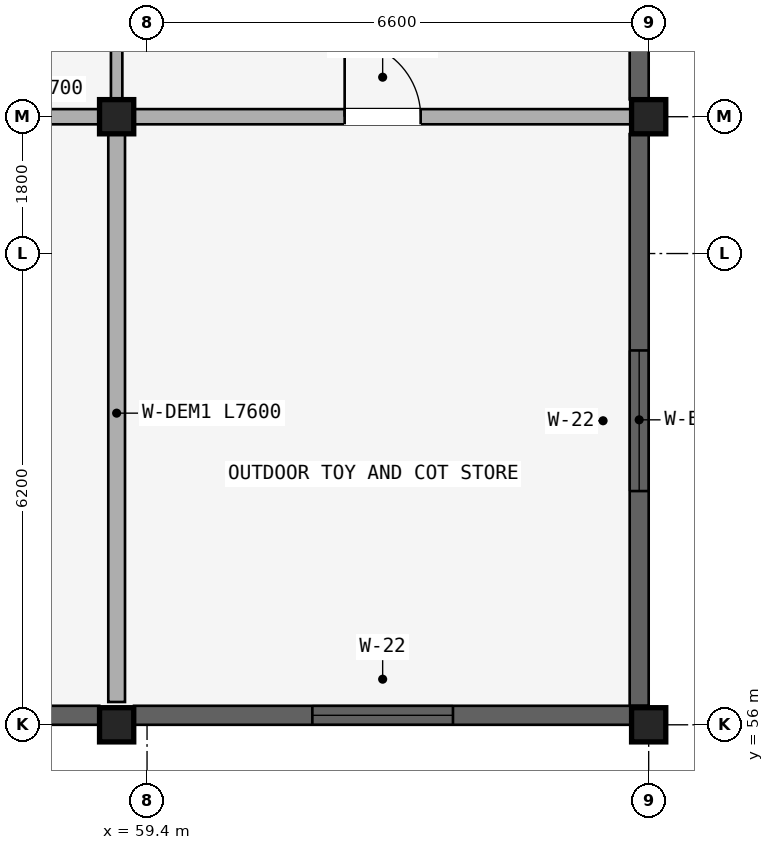
"""IFC4 building model, lengths in metres.
Left out: names, types, materials, properties, quantities, classifications, styles, units other than length and angle.
Written with IfcOpenShell. Run it as: python <this file> out.ifc"""

import sys

from ifc_helpers import new_model, si_unit, direction, frame, frame_2d, origin, origin_2d, place, context, subcontext, project, spatial, rectangle, extrude, element, fill, save


model = new_model("IFC4")
c1 = context("Model", 3, precision=1e-05, world=origin(), true_north=direction((0.0, 1.0)))
c2 = subcontext(c1, "Body", "Model", "MODEL_VIEW")
j1 = project(units=[si_unit("LENGTHUNIT", "METRE"), si_unit("PLANEANGLEUNIT", "RADIAN")], contexts=[c1])
p1 = place(None, origin())
s1 = spatial("IfcSite", under=j1, at=p1, CompositionType="ELEMENT")
p2 = place(p1, origin())
s2 = spatial("IfcBuilding", under=s1, at=p2, CompositionType="ELEMENT")
p3 = place(p2, frame((0.0, 0.0, 4.5)))
s3 = spatial("IfcBuildingStorey", under=s2, at=p3, CompositionType="ELEMENT", Elevation=4.5)
p4 = place(p3, frame((59.0, 56.0, 0.0), z_axis=(0.0, 0.0, 1.0), x_axis=(1.0, 0.0, 0.0)))
e1 = element("IfcColumn", 1, at=p4, inside=s3, PredefinedType="COLUMN", context=c2, shape_type="SweptSolid", body=[
    extrude(rectangle(XDim=0.45, YDim=0.45, at=origin_2d()), origin(), (0.0, 0.0, 1.0), 4.85),
])
p5 = place(p3, frame((59.0, 64.0, 0.0), z_axis=(0.0, 0.0, 1.0), x_axis=(1.0, 0.0, 0.0)))
e2 = element("IfcColumn", 2, at=p5, inside=s3, PredefinedType="COLUMN", context=c2, shape_type="SweptSolid", body=[
    extrude(rectangle(XDim=0.45, YDim=0.45, at=origin_2d()), origin(), (0.0, 0.0, 1.0), 4.0),
])
p6 = place(p3, frame((66.0, 56.0, 0.0), z_axis=(0.0, 0.0, 1.0), x_axis=(1.0, 0.0, 0.0)))
e3 = element("IfcColumn", 3, at=p6, inside=s3, PredefinedType="COLUMN", context=c2, shape_type="SweptSolid", body=[
    extrude(rectangle(XDim=0.45, YDim=0.45, at=origin_2d()), origin(), (0.0, 0.0, 1.0), 4.85),
])
p7 = place(p3, frame((66.0, 64.0, 0.0), z_axis=(0.0, 0.0, 1.0), x_axis=(1.0, 0.0, 0.0)))
e4 = element("IfcColumn", 4, at=p7, inside=s3, PredefinedType="COLUMN", context=c2, shape_type="SweptSolid", body=[
    extrude(rectangle(XDim=0.45, YDim=0.45, at=origin_2d()), origin(), (0.0, 0.0, 1.0), 4.0),
])
p8 = place(p3, frame((52.15, 64.0, 0.0), z_axis=(0.0, 0.0, 1.0), x_axis=(1.0, 0.0, 0.0)))
e5 = element("IfcWall", 5, at=p8, inside=s3, PredefinedType="STANDARD", context=c2, shape_type="SweptSolid", body=[
    extrude(rectangle(XDim=6.7, YDim=0.2, at=frame_2d((3.35, 0.0))), origin(), (0.0, 0.0, 1.0), 2.792),
])
p9 = place(p8, frame((2.85, 0.0, 0.0)))
e6 = element("IfcOpeningElement", 6, at=p9, cuts=e5, PredefinedType="OPENING", context=c2, shape_type="SweptSolid", body=[
    extrude(rectangle(XDim=1.0, YDim=2.15, at=frame_2d((0.5, 1.075))), frame((0.0, 0.11, 0.0), z_axis=(0.0, -1.0, 0.0), x_axis=(1.0, 0.0, 0.0)), (0.0, 0.0, 1.0), 0.22),
])
p10 = place(p3, frame((59.15, 64.0, 0.0), z_axis=(0.0, 0.0, 1.0), x_axis=(1.0, 0.0, 0.0)))
e7 = element("IfcWall", 7, at=p10, inside=s3, PredefinedType="STANDARD", context=c2, shape_type="SweptSolid", body=[
    extrude(rectangle(XDim=6.7, YDim=0.2, at=frame_2d((3.35, 0.0))), origin(), (0.0, 0.0, 1.0), 2.792),
])
p11 = place(p10, frame((2.85, 0.0, 0.0)))
e8 = element("IfcOpeningElement", 8, at=p11, cuts=e7, PredefinedType="OPENING", context=c2, shape_type="SweptSolid", body=[
    extrude(rectangle(XDim=1.0, YDim=2.15, at=frame_2d((0.5, 1.075))), frame((0.0, 0.11, 0.0), z_axis=(0.0, -1.0, 0.0), x_axis=(1.0, 0.0, 0.0)), (0.0, 0.0, 1.0), 0.22),
])
p12 = place(p3, frame((59.0, 56.3, 0.0), z_axis=(0.0, 0.0, 1.0), x_axis=(0.0, 1.0, 0.0)))
e9 = element("IfcWall", 9, at=p12, inside=s3, PredefinedType="STANDARD", context=c2, shape_type="SweptSolid", body=[
    extrude(rectangle(XDim=7.6, YDim=0.22, at=frame_2d((3.8, 0.0))), origin(), (0.0, 0.0, 1.0), 3.442),
])
p13 = place(p3, frame((59.0, 64.1, 0.0), z_axis=(0.0, 0.0, 1.0), x_axis=(0.0, 1.0, 0.0)))
e10 = element("IfcWall", 10, at=p13, inside=s3, PredefinedType="PARTITIONING", context=c2, shape_type="SweptSolid", body=[
    extrude(rectangle(XDim=7.8, YDim=0.15, at=frame_2d((3.9, 0.0))), origin(), (0.0, 0.0, 1.0), 2.792),
])
p14 = place(p13, frame((3.0, 0.0, 0.0)))
e11 = element("IfcOpeningElement", 11, at=p14, cuts=e10, PredefinedType="OPENING", context=c2, shape_type="SweptSolid", body=[
    extrude(rectangle(XDim=1.8, YDim=2.2, at=frame_2d((0.9, 1.1))), frame((0.0, 0.085, 0.0), z_axis=(0.0, -1.0, 0.0), x_axis=(1.0, 0.0, 0.0)), (0.0, 0.0, 1.0), 0.17),
])
p15 = place(p3, frame((52.229, 56.125, 0.0), z_axis=(0.0, 0.0, 1.0), x_axis=(1.0, 0.0, 0.0)))
e12 = element("IfcWall", 12, at=p15, inside=s3, PredefinedType="STANDARD", context=c2, shape_type="SweptSolid", body=[
    extrude(rectangle(XDim=6.543, YDim=0.25, at=frame_2d((3.271, 0.0))), origin(), (0.0, 0.0, 1.0), 3.442),
])
p16 = place(p15, frame((2.346, 0.0, 0.88)))
e13 = element("IfcOpeningElement", 13, at=p16, cuts=e12, PredefinedType="OPENING", context=c2, shape_type="SweptSolid", body=[
    extrude(rectangle(XDim=1.85, YDim=1.9, at=frame_2d((0.925, 0.95))), frame((0.0, 0.135, 0.0), z_axis=(0.0, -1.0, 0.0), x_axis=(1.0, 0.0, 0.0)), (0.0, 0.0, 1.0), 0.27),
])
p17 = place(p3, frame((59.229, 56.125, 0.0), z_axis=(0.0, 0.0, 1.0), x_axis=(1.0, 0.0, 0.0)))
e14 = element("IfcWall", 14, at=p17, inside=s3, PredefinedType="STANDARD", context=c2, shape_type="SweptSolid", body=[
    extrude(rectangle(XDim=6.771, YDim=0.25, at=frame_2d((3.386, 0.0))), origin(), (0.0, 0.0, 1.0), 3.442),
])
p18 = place(p17, frame((2.346, 0.0, 0.88)))
e15 = element("IfcOpeningElement", 15, at=p18, cuts=e14, PredefinedType="OPENING", context=c2, shape_type="SweptSolid", body=[
    extrude(rectangle(XDim=1.85, YDim=1.9, at=frame_2d((0.925, 0.95))), frame((0.0, 0.135, 0.0), z_axis=(0.0, -1.0, 0.0), x_axis=(1.0, 0.0, 0.0)), (0.0, 0.0, 1.0), 0.27),
])
p19 = place(p3, frame((65.875, 56.253, 0.0), z_axis=(0.0, 0.0, 1.0), x_axis=(0.0, 1.0, 0.0)))
e16 = element("IfcWall", 16, at=p19, inside=s3, PredefinedType="STANDARD", context=c2, shape_type="SweptSolid", body=[
    extrude(rectangle(XDim=7.519, YDim=0.25, at=frame_2d((3.759, 0.0))), origin(), (0.0, 0.0, 1.0), 3.442),
])
p20 = place(p19, frame((2.822, 0.0, 0.88)))
e17 = element("IfcOpeningElement", 17, at=p20, cuts=e16, PredefinedType="OPENING", context=c2, shape_type="SweptSolid", body=[
    extrude(rectangle(XDim=1.85, YDim=1.9, at=frame_2d((0.925, 0.95))), frame((0.0, 0.135, 0.0), z_axis=(0.0, -1.0, 0.0), x_axis=(1.0, 0.0, 0.0)), (0.0, 0.0, 1.0), 0.27),
])
p21 = place(p3, frame((65.875, 64.229, 0.0), z_axis=(0.0, 0.0, 1.0), x_axis=(0.0, 1.0, 0.0)))
e18 = element("IfcWall", 18, at=p21, inside=s3, PredefinedType="STANDARD", context=c2, shape_type="SweptSolid", body=[
    extrude(rectangle(XDim=7.543, YDim=0.25, at=frame_2d((3.771, 0.0))), origin(), (0.0, 0.0, 1.0), 2.792),
])
p22 = place(p21, frame((2.846, 0.0, 0.692)))
e19 = element("IfcOpeningElement", 19, at=p22, cuts=e18, PredefinedType="OPENING", context=c2, shape_type="SweptSolid", body=[
    extrude(rectangle(XDim=1.85, YDim=1.9, at=frame_2d((0.925, 0.95))), frame((0.0, 0.135, 0.0), z_axis=(0.0, -1.0, 0.0), x_axis=(1.0, 0.0, 0.0)), (0.0, 0.0, 1.0), 0.27),
])
p23 = place(p18, origin())
e20 = element("IfcWindow", 20, at=p23, inside=s3, PartitioningType="DOUBLE_PANEL_VERTICAL", PredefinedType="WINDOW", context=c2, shape_type="SweptSolid", body=[
    extrude(rectangle(XDim=1.85, YDim=1.9, at=frame_2d((0.925, 0.95))), frame((0.0, 0.03, 0.0), z_axis=(0.0, -1.0, 0.0), x_axis=(1.0, 0.0, 0.0)), (0.0, 0.0, 1.0), 0.06),
])
fill(e15, e20)
p24 = place(p20, origin())
e21 = element("IfcWindow", 21, at=p24, inside=s3, PartitioningType="DOUBLE_PANEL_VERTICAL", PredefinedType="WINDOW", context=c2, shape_type="SweptSolid", body=[
    extrude(rectangle(XDim=1.85, YDim=1.9, at=frame_2d((0.925, 0.95))), frame((0.0, 0.03, 0.0), z_axis=(0.0, -1.0, 0.0), x_axis=(1.0, 0.0, 0.0)), (0.0, 0.0, 1.0), 0.06),
])
fill(e17, e21)
p25 = place(p11, frame((1.0, 0.0, 0.0), z_axis=(0.0, 0.0, 1.0), x_axis=(-1.0, 0.0, 0.0)))
e22 = element("IfcDoor", 22, at=p25, inside=s3, OperationType="SINGLE_SWING_RIGHT", PredefinedType="DOOR", context=c2, shape_type="SweptSolid", body=[
    extrude(rectangle(XDim=1.0, YDim=2.15, at=frame_2d((0.5, 1.075))), frame((0.0, 0.025, 0.0), z_axis=(0.0, -1.0, 0.0), x_axis=(1.0, 0.0, 0.0)), (0.0, 0.0, 1.0), 0.05),
])
fill(e8, e22)
save(model, sys.argv[1])
